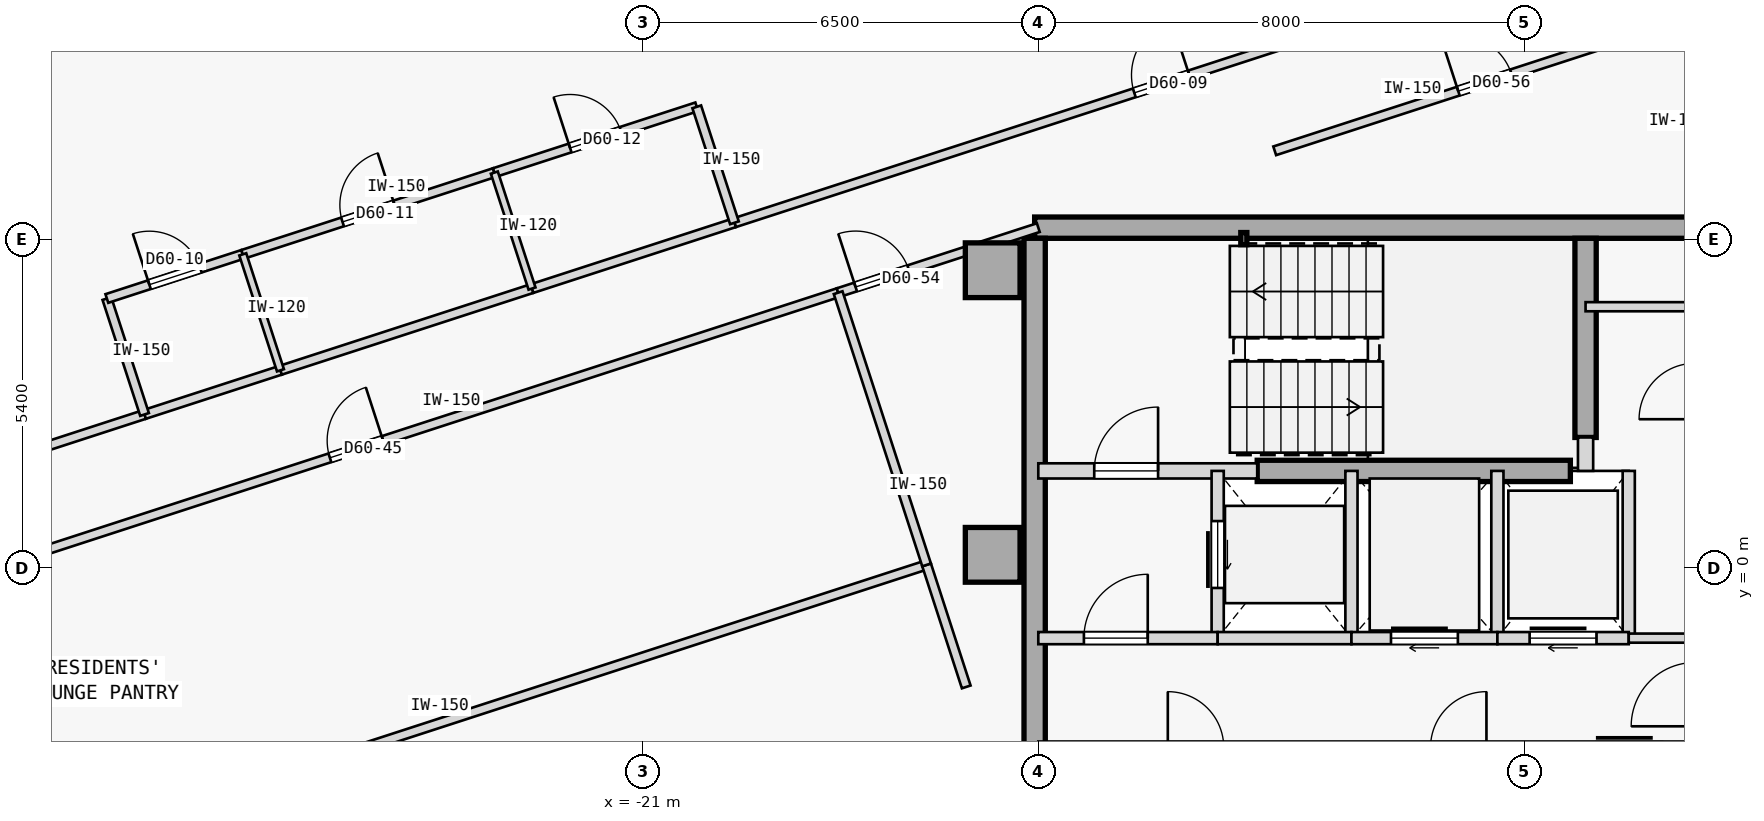
"""IFC4 building model, lengths in metres.
Left out: names, types, materials, properties, quantities, classifications, styles, units other than length and angle.
Written with IfcOpenShell. Run it as: python <this file> out.ifc"""

import sys

from ifc_helpers import new_model, si_unit, direction, frame, frame_2d, origin, origin_2d, place, context, subcontext, project, spatial, rectangle, hollow_rectangle, extrude, element, fill, save


model = new_model("IFC4")
c1 = context("Model", 3, precision=1e-05, world=origin(), true_north=direction((0.0, 1.0)))
c2 = subcontext(c1, "Body", "Model", "MODEL_VIEW")
j1 = project(units=[si_unit("LENGTHUNIT", "METRE"), si_unit("PLANEANGLEUNIT", "RADIAN")], contexts=[c1])
p1 = place(None, origin())
s1 = spatial("IfcSite", under=j1, at=p1, CompositionType="ELEMENT")
p2 = place(p1, origin())
s2 = spatial("IfcBuilding", under=s1, at=p2, CompositionType="ELEMENT")
p3 = place(p2, frame((0.0, 0.0, 227.65)))
s3 = spatial("IfcBuildingStorey", under=s2, at=p3, CompositionType="ELEMENT", Elevation=227.65)
for number, where, z_axis, x_axis in (
    (1, (-15.25, 4.9, 0.0), (0.0, 0.0, 1.0), (1.0, 0.0, 0.0)),
    (2, (-15.25, 0.22, 0.0), (0.0, 0.0, 1.0), (1.0, 0.0, 0.0)),
):
    element("IfcColumn", number, at=place(p3, frame(where, z_axis=z_axis, x_axis=x_axis)), inside=s3, PredefinedType="COLUMN", context=c2, shape_type="SweptSolid", body=[
        extrude(rectangle(XDim=0.9, YDim=0.9, at=origin_2d()), origin(), (0.0, 0.0, 1.0), 3.35),
    ])
p4 = place(p3, frame((-14.56, 5.6, 0.0), z_axis=(0.0, 0.0, 1.0), x_axis=(1.0, 0.0, 0.0)))
e3 = element("IfcWall", 3, at=p4, inside=s3, PredefinedType="SHEAR", context=c2, shape_type="SweptSolid", body=[
    extrude(rectangle(XDim=11.41, YDim=0.35, at=frame_2d((5.705, 0.0))), origin(), (0.0, 0.0, 1.0), 3.125),
])
p5 = place(p3, frame((-14.56, -5.425, 0.0), z_axis=(0.0, 0.0, 1.0), x_axis=(0.0, 1.0, 0.0)))
e4 = element("IfcWall", 4, at=p5, inside=s3, PredefinedType="SHEAR", context=c2, shape_type="SweptSolid", body=[
    extrude(rectangle(XDim=10.85, YDim=0.35, at=frame_2d((5.425, 0.0))), origin(), (0.0, 0.0, 1.0), 3.125),
])
p6 = place(p3, frame((-5.5, 2.15, 0.0), z_axis=(0.0, 0.0, 1.0), x_axis=(0.0, 1.0, 0.0)))
e5 = element("IfcWall", 5, at=p6, inside=s3, PredefinedType="SHEAR", context=c2, shape_type="SweptSolid", body=[
    extrude(rectangle(XDim=3.275, YDim=0.35, at=frame_2d((1.638, 0.0))), origin(), (0.0, 0.0, 1.0), 3.125),
])
p7 = place(p3, frame((-10.9, 1.6, 0.0), z_axis=(0.0, 0.0, 1.0), x_axis=(1.0, 0.0, 0.0)))
e6 = element("IfcWall", 6, at=p7, inside=s3, PredefinedType="SHEAR", context=c2, shape_type="SweptSolid", body=[
    extrude(rectangle(XDim=5.15, YDim=0.35, at=frame_2d((2.575, 0.0))), origin(), (0.0, 0.0, 1.0), 3.125),
])
p8 = place(p3, frame((-11.12, 5.42, 0.0), z_axis=(0.0, 0.0, 1.0), x_axis=(1.0, 0.0, 0.0)))
e7 = element("IfcColumn", 7, at=p8, inside=s3, PredefinedType="COLUMN", context=c2, shape_type="SweptSolid", body=[
    extrude(hollow_rectangle(XDim=0.1, YDim=0.2, WallThickness=0.008, at=origin_2d()), origin(), (0.0, 0.0, 1.0), 3.35),
])
p9 = place(p3, frame((-14.5, 1.6, 0.0), z_axis=(0.0, 0.0, 1.0), x_axis=(1.0, 0.0, 0.0)))
e8 = element("IfcWall", 8, at=p9, inside=s3, PredefinedType="STANDARD", context=c2, shape_type="SweptSolid", body=[
    extrude(rectangle(XDim=3.6, YDim=0.25, at=frame_2d((1.8, 0.0))), origin(), (0.0, 0.0, 1.0), 3.125),
])
p10 = place(p9, frame((0.92, 0.0, 0.0)))
e9 = element("IfcOpeningElement", 9, at=p10, cuts=e8, PredefinedType="OPENING", context=c2, shape_type="SweptSolid", body=[
    extrude(rectangle(XDim=1.05, YDim=2.15, at=frame_2d((0.525, 1.075))), frame((0.0, 0.135, 0.0), z_axis=(0.0, -1.0, 0.0), x_axis=(1.0, 0.0, 0.0)), (0.0, 0.0, 1.0), 0.27),
])
p11 = place(p3, frame((-5.5, 1.6, 0.0), z_axis=(0.0, 0.0, 1.0), x_axis=(0.0, 1.0, 0.0)))
e10 = element("IfcWall", 10, at=p11, inside=s3, PredefinedType="STANDARD", context=c2, shape_type="SweptSolid", body=[
    extrude(rectangle(XDim=0.55, YDim=0.25, at=frame_2d((0.275, 0.0))), origin(), (0.0, 0.0, 1.0), 3.125),
])
p12 = place(p3, frame((-11.55, -1.15, 0.0), z_axis=(0.0, 0.0, 1.0), x_axis=(0.0, 1.0, 0.0)))
e11 = element("IfcWall", 11, at=p12, inside=s3, PredefinedType="STANDARD", context=c2, shape_type="SweptSolid", body=[
    extrude(rectangle(XDim=2.75, YDim=0.2, at=frame_2d((1.375, 0.0))), origin(), (0.0, 0.0, 1.0), 3.125),
])
p13 = place(p12, frame((0.825, 0.0, 0.0)))
e12 = element("IfcOpeningElement", 12, at=p13, cuts=e11, PredefinedType="OPENING", context=c2, shape_type="SweptSolid", body=[
    extrude(rectangle(XDim=1.1, YDim=2.15, at=frame_2d((0.55, 1.075))), frame((0.0, 0.11, 0.0), z_axis=(0.0, -1.0, 0.0), x_axis=(1.0, 0.0, 0.0)), (0.0, 0.0, 1.0), 0.22),
])
p14 = place(p3, frame((-9.35, -1.15, 0.0), z_axis=(0.0, 0.0, 1.0), x_axis=(0.0, 1.0, 0.0)))
e13 = element("IfcWall", 13, at=p14, inside=s3, PredefinedType="STANDARD", context=c2, shape_type="SweptSolid", body=[
    extrude(rectangle(XDim=2.75, YDim=0.2, at=frame_2d((1.375, 0.0))), origin(), (0.0, 0.0, 1.0), 3.125),
])
p15 = place(p3, frame((-14.5, -1.15, 0.0), z_axis=(0.0, 0.0, 1.0), x_axis=(1.0, 0.0, 0.0)))
e14 = element("IfcWall", 14, at=p15, inside=s3, PredefinedType="STANDARD", context=c2, shape_type="SweptSolid", body=[
    extrude(rectangle(XDim=2.95, YDim=0.2, at=frame_2d((1.475, 0.0))), origin(), (0.0, 0.0, 1.0), 3.125),
])
p16 = place(p15, frame((0.75, 0.0, 0.0)))
e15 = element("IfcOpeningElement", 15, at=p16, cuts=e14, PredefinedType="OPENING", context=c2, shape_type="SweptSolid", body=[
    extrude(rectangle(XDim=1.05, YDim=2.18, at=frame_2d((0.525, 1.09))), frame((0.0, 0.11, 0.0), z_axis=(0.0, -1.0, 0.0), x_axis=(1.0, 0.0, 0.0)), (0.0, 0.0, 1.0), 0.22),
])
p17 = place(p3, frame((-11.55, -1.15, 0.0), z_axis=(0.0, 0.0, 1.0), x_axis=(1.0, 0.0, 0.0)))
e16 = element("IfcWall", 16, at=p17, inside=s3, PredefinedType="STANDARD", context=c2, shape_type="SweptSolid", body=[
    extrude(rectangle(XDim=2.2, YDim=0.2, at=frame_2d((1.1, 0.0))), origin(), (0.0, 0.0, 1.0), 3.125),
])
p18 = place(p3, frame((-6.95, -1.15, 0.0), z_axis=(0.0, 0.0, 1.0), x_axis=(0.0, 1.0, 0.0)))
e17 = element("IfcWall", 17, at=p18, inside=s3, PredefinedType="STANDARD", context=c2, shape_type="SweptSolid", body=[
    extrude(rectangle(XDim=2.75, YDim=0.2, at=frame_2d((1.375, 0.0))), origin(), (0.0, 0.0, 1.0), 3.125),
])
p19 = place(p3, frame((-9.35, -1.15, 0.0), z_axis=(0.0, 0.0, 1.0), x_axis=(1.0, 0.0, 0.0)))
e18 = element("IfcWall", 18, at=p19, inside=s3, PredefinedType="STANDARD", context=c2, shape_type="SweptSolid", body=[
    extrude(rectangle(XDim=2.4, YDim=0.2, at=frame_2d((1.2, 0.0))), origin(), (0.0, 0.0, 1.0), 3.125),
])
p20 = place(p19, frame((0.65, 0.0, 0.0)))
e19 = element("IfcOpeningElement", 19, at=p20, cuts=e18, PredefinedType="OPENING", context=c2, shape_type="SweptSolid", body=[
    extrude(rectangle(XDim=1.1, YDim=2.15, at=frame_2d((0.55, 1.075))), frame((0.0, 0.11, 0.0), z_axis=(0.0, -1.0, 0.0), x_axis=(1.0, 0.0, 0.0)), (0.0, 0.0, 1.0), 0.22),
])
p21 = place(p3, frame((-4.79, -1.15, 0.0), z_axis=(0.0, 0.0, 1.0), x_axis=(0.0, 1.0, 0.0)))
e20 = element("IfcWall", 20, at=p21, inside=s3, PredefinedType="STANDARD", context=c2, shape_type="SweptSolid", body=[
    extrude(rectangle(XDim=2.75, YDim=0.2, at=frame_2d((1.375, 0.0))), origin(), (0.0, 0.0, 1.0), 3.125),
])
p22 = place(p3, frame((-6.95, -1.15, 0.0), z_axis=(0.0, 0.0, 1.0), x_axis=(1.0, 0.0, 0.0)))
e21 = element("IfcWall", 21, at=p22, inside=s3, PredefinedType="STANDARD", context=c2, shape_type="SweptSolid", body=[
    extrude(rectangle(XDim=2.16, YDim=0.2, at=frame_2d((1.08, 0.0))), origin(), (0.0, 0.0, 1.0), 3.125),
])
p23 = place(p22, frame((0.53, 0.0, 0.0)))
e22 = element("IfcOpeningElement", 22, at=p23, cuts=e21, PredefinedType="OPENING", context=c2, shape_type="SweptSolid", body=[
    extrude(rectangle(XDim=1.1, YDim=2.15, at=frame_2d((0.55, 1.075))), frame((0.0, 0.11, 0.0), z_axis=(0.0, -1.0, 0.0), x_axis=(1.0, 0.0, 0.0)), (0.0, 0.0, 1.0), 0.22),
])
p24 = place(p3, frame((-4.79, -1.15, 0.0), z_axis=(0.0, 0.0, 1.0), x_axis=(1.0, 0.0, 0.0)))
e23 = element("IfcWall", 23, at=p24, inside=s3, PredefinedType="PARTITIONING", context=c2, shape_type="SweptSolid", body=[
    extrude(rectangle(XDim=1.09, YDim=0.15, at=frame_2d((0.545, 0.0))), origin(), (0.0, 0.0, 1.0), 3.125),
])
p25 = place(p3, frame((-5.5, 4.3, 0.0), z_axis=(0.0, 0.0, 1.0), x_axis=(1.0, 0.0, 0.0)))
e24 = element("IfcWall", 24, at=p25, inside=s3, PredefinedType="PARTITIONING", context=c2, shape_type="SweptSolid", body=[
    extrude(rectangle(XDim=1.8, YDim=0.15, at=frame_2d((0.9, 0.0))), origin(), (0.0, 0.0, 1.0), 3.125),
])
p26 = place(p3, frame((-36.012, 0.314, 0.0), z_axis=(0.0, 0.0, 1.0), x_axis=(0.951054850325, 0.309022121658, 0.0)))
e25 = element("IfcWall", 25, at=p26, inside=s3, PredefinedType="PARTITIONING", context=c2, shape_type="SweptSolid", body=[
    extrude(rectangle(XDim=7.165, YDim=0.15, at=frame_2d((3.583, 0.0))), origin(), (0.0, 0.0, 1.0), 3.125),
])
p27 = place(p3, frame((-19.497, 5.68, 0.0), z_axis=(0.0, 0.0, 1.0), x_axis=(0.95105300492, 0.309027801067, 0.0)))
e26 = element("IfcWall", 26, at=p27, inside=s3, PredefinedType="PARTITIONING", context=c2, shape_type="SweptSolid", body=[
    extrude(rectangle(XDim=14.779, YDim=0.15, at=frame_2d((7.39, 0.0))), origin(), (0.0, 0.0, 1.0), 3.125),
])
p28 = place(p27, frame((6.915, 0.0, 0.0)))
e27 = element("IfcOpeningElement", 27, at=p28, cuts=e26, PredefinedType="OPENING", context=c2, shape_type="SweptSolid", body=[
    extrude(rectangle(XDim=0.95, YDim=2.15, at=frame_2d((0.475, 1.075))), frame((0.0, 0.085, 0.0), z_axis=(0.0, -1.0, 0.0), x_axis=(1.0, 0.0, 0.0)), (0.0, 0.0, 1.0), 0.17),
])
p29 = place(p3, frame((-29.198, 2.528, 0.0), z_axis=(0.0, 0.0, 1.0), x_axis=(0.951076048914, 0.308956872689, 0.0)))
e28 = element("IfcWall", 28, at=p29, inside=s3, PredefinedType="PARTITIONING", context=c2, shape_type="SweptSolid", body=[
    extrude(rectangle(XDim=2.35, YDim=0.15, at=frame_2d((1.175, 0.0))), origin(), (0.0, 0.0, 1.0), 3.125),
])
p30 = place(p3, frame((-26.963, 3.254, 0.0), z_axis=(0.0, 0.0, 1.0), x_axis=(0.951057987102, 0.309012467661, 0.0)))
e29 = element("IfcWall", 29, at=p30, inside=s3, PredefinedType="PARTITIONING", context=c2, shape_type="SweptSolid", body=[
    extrude(rectangle(XDim=4.35, YDim=0.15, at=frame_2d((2.175, 0.0))), origin(), (0.0, 0.0, 1.0), 3.125),
])
p31 = place(p3, frame((-22.826, 4.599, 0.0), z_axis=(0.0, 0.0, 1.0), x_axis=(0.951055596592, 0.309019824916, 0.0)))
e30 = element("IfcWall", 30, at=p31, inside=s3, PredefinedType="PARTITIONING", context=c2, shape_type="SweptSolid", body=[
    extrude(rectangle(XDim=3.5, YDim=0.15, at=frame_2d((1.75, 0.0))), origin(), (0.0, 0.0, 1.0), 3.125),
])
p32 = place(p3, frame((-33.633, -0.616, 0.0), z_axis=(0.0, 0.0, 1.0), x_axis=(0.951058192995, 0.309011833974, 0.0)))
e31 = element("IfcWall", 31, at=p32, inside=s3, PredefinedType="PARTITIONING", context=c2, shape_type="SweptSolid", body=[
    extrude(rectangle(XDim=16.657, YDim=0.15, at=frame_2d((8.329, 0.0))), origin(), (0.0, 0.0, 1.0), 3.125),
])
p33 = place(p32, frame((7.868, 0.0, 0.0)))
e32 = element("IfcOpeningElement", 32, at=p33, cuts=e31, PredefinedType="OPENING", context=c2, shape_type="SweptSolid", body=[
    extrude(rectangle(XDim=0.92, YDim=2.15, at=frame_2d((0.46, 1.075))), frame((0.0, 0.085, 0.0), z_axis=(0.0, -1.0, 0.0), x_axis=(1.0, 0.0, 0.0)), (0.0, 0.0, 1.0), 0.17),
])
p34 = place(p3, frame((-17.792, 4.531, 0.0), z_axis=(0.0, 0.0, 1.0), x_axis=(0.951047546178, 0.309044600193, 0.0)))
e33 = element("IfcWall", 33, at=p34, inside=s3, PredefinedType="PARTITIONING", context=c2, shape_type="SweptSolid", body=[
    extrude(rectangle(XDim=3.461, YDim=0.15, at=frame_2d((1.73, 0.0))), origin(), (0.0, 0.0, 1.0), 3.125),
])
p35 = place(p34, frame((0.302, 0.0, 0.0)))
e34 = element("IfcOpeningElement", 34, at=p35, cuts=e33, PredefinedType="OPENING", context=c2, shape_type="SweptSolid", body=[
    extrude(rectangle(XDim=0.92, YDim=2.15, at=frame_2d((0.46, 1.075))), frame((0.0, 0.085, 0.0), z_axis=(0.0, -1.0, 0.0), x_axis=(1.0, 0.0, 0.0)), (0.0, 0.0, 1.0), 0.17),
])
p36 = place(p3, frame((-10.612, 6.864, 0.0), z_axis=(0.0, 0.0, 1.0), x_axis=(0.951060972078, 0.309003280548, 0.0)))
e35 = element("IfcWall", 35, at=p36, inside=s3, PredefinedType="PARTITIONING", context=c2, shape_type="SweptSolid", body=[
    extrude(rectangle(XDim=7.268, YDim=0.15, at=frame_2d((3.634, 0.0))), origin(), (0.0, 0.0, 1.0), 3.125),
])
p37 = place(p36, frame((3.174, 0.0, 0.0)))
e36 = element("IfcOpeningElement", 36, at=p37, cuts=e35, PredefinedType="OPENING", context=c2, shape_type="SweptSolid", body=[
    extrude(rectangle(XDim=0.92, YDim=2.15, at=frame_2d((0.46, 1.075))), frame((0.0, 0.085, 0.0), z_axis=(0.0, -1.0, 0.0), x_axis=(1.0, 0.0, 0.0)), (0.0, 0.0, 1.0), 0.17),
])
p38 = place(p3, frame((-29.198, 2.528, 0.0), z_axis=(0.0, 0.0, 1.0), x_axis=(-0.308948390121, 0.951078804433, 0.0)))
e37 = element("IfcWall", 37, at=p38, inside=s3, PredefinedType="PARTITIONING", context=c2, shape_type="SweptSolid", body=[
    extrude(rectangle(XDim=2.005, YDim=0.15, at=frame_2d((1.002, 0.0))), origin(), (0.0, 0.0, 1.0), 3.125),
])
p39 = place(p3, frame((-29.817, 4.435, 0.0), z_axis=(0.0, 0.0, 1.0), x_axis=(0.951035595692, 0.309081373955, 0.0)))
e38 = element("IfcWall", 38, at=p39, inside=s3, PredefinedType="PARTITIONING", context=c2, shape_type="SweptSolid", body=[
    extrude(rectangle(XDim=2.35, YDim=0.15, at=frame_2d((1.175, 0.0))), origin(), (0.0, 0.0, 1.0), 3.125),
])
p40 = place(p39, frame((0.735, 0.0, 0.0)))
e39 = element("IfcOpeningElement", 39, at=p40, cuts=e38, PredefinedType="OPENING", context=c2, shape_type="SweptSolid", body=[
    extrude(rectangle(XDim=0.88, YDim=2.15, at=frame_2d((0.44, 1.075))), frame((0.0, 0.085, 0.0), z_axis=(0.0, -1.0, 0.0), x_axis=(1.0, 0.0, 0.0)), (0.0, 0.0, 1.0), 0.17),
])
p41 = place(p3, frame((-27.583, 5.161, 0.0), z_axis=(0.0, 0.0, 1.0), x_axis=(0.951057987102, 0.309012467661, 0.0)))
e40 = element("IfcWall", 40, at=p41, inside=s3, PredefinedType="PARTITIONING", context=c2, shape_type="SweptSolid", body=[
    extrude(rectangle(XDim=4.35, YDim=0.15, at=frame_2d((2.175, 0.0))), origin(), (0.0, 0.0, 1.0), 3.125),
])
p42 = place(p41, frame((1.725, 0.0, 0.0)))
e41 = element("IfcOpeningElement", 41, at=p42, cuts=e40, PredefinedType="OPENING", context=c2, shape_type="SweptSolid", body=[
    extrude(rectangle(XDim=0.9, YDim=2.15, at=frame_2d((0.45, 1.075))), frame((0.0, 0.085, 0.0), z_axis=(0.0, -1.0, 0.0), x_axis=(1.0, 0.0, 0.0)), (0.0, 0.0, 1.0), 0.17),
])
p43 = place(p3, frame((-23.445, 6.506, 0.0), z_axis=(0.0, 0.0, 1.0), x_axis=(0.951055596592, 0.309019824916, 0.0)))
e42 = element("IfcWall", 42, at=p43, inside=s3, PredefinedType="PARTITIONING", context=c2, shape_type="SweptSolid", body=[
    extrude(rectangle(XDim=3.5, YDim=0.15, at=frame_2d((1.75, 0.0))), origin(), (0.0, 0.0, 1.0), 3.125),
])
p44 = place(p43, frame((1.31, 0.0, 0.0)))
e43 = element("IfcOpeningElement", 43, at=p44, cuts=e42, PredefinedType="OPENING", context=c2, shape_type="SweptSolid", body=[
    extrude(rectangle(XDim=0.88, YDim=2.15, at=frame_2d((0.44, 1.075))), frame((0.0, 0.085, 0.0), z_axis=(0.0, -1.0, 0.0), x_axis=(1.0, 0.0, 0.0)), (0.0, 0.0, 1.0), 0.17),
])
p45 = place(p3, frame((-19.497, 5.68, 0.0), z_axis=(0.0, 0.0, 1.0), x_axis=(-0.309022749039, 0.951054646472, 0.0)))
e44 = element("IfcWall", 44, at=p45, inside=s3, PredefinedType="PARTITIONING", context=c2, shape_type="SweptSolid", body=[
    extrude(rectangle(XDim=2.005, YDim=0.15, at=frame_2d((1.002, 0.0))), origin(), (0.0, 0.0, 1.0), 3.125),
])
for number, where, z_axis, x_axis in (
    (45, (-26.963, 3.254, 0.0), (0.0, 0.0, 1.0), (-0.309, 0.951, 0.0)),
    (46, (-22.826, 4.599, 0.0), (0.0, 0.0, 1.0), (-0.309, 0.951, 0.0)),
):
    element("IfcWall", number, at=place(p3, frame(where, z_axis=z_axis, x_axis=x_axis)), inside=s3, PredefinedType="PARTITIONING", context=c2, shape_type="SweptSolid", body=[
        extrude(rectangle(XDim=2.005, YDim=0.12, at=frame_2d((1.002, 0.0))), origin(), (0.0, 0.0, 1.0), 3.125),
    ])
p46 = place(p3, frame((-32.179, -5.093, 0.0), z_axis=(0.0, 0.0, 1.0), x_axis=(0.951053885426, 0.309025091239, 0.0)))
e47 = element("IfcWall", 47, at=p46, inside=s3, PredefinedType="PARTITIONING", context=c2, shape_type="SweptSolid", body=[
    extrude(rectangle(XDim=16.657, YDim=0.15, at=frame_2d((8.329, 0.0))), origin(), (0.0, 0.0, 1.0), 3.125),
])
p47 = place(p3, frame((-15.685, -1.952, 0.0), z_axis=(0.0, 0.0, 1.0), x_axis=(-0.308929092959, 0.951085072706, 0.0)))
e48 = element("IfcWall", 48, at=p47, inside=s3, PredefinedType="PARTITIONING", context=c2, shape_type="SweptSolid", body=[
    extrude(rectangle(XDim=2.11, YDim=0.15, at=frame_2d((1.055, 0.0))), origin(), (0.0, 0.0, 1.0), 3.125),
])
p48 = place(p3, frame((-16.337, 0.054, 0.0), z_axis=(0.0, 0.0, 1.0), x_axis=(-0.309029776355, 0.951052363083, 0.0)))
e49 = element("IfcWall", 49, at=p48, inside=s3, PredefinedType="PARTITIONING", context=c2, shape_type="SweptSolid", body=[
    extrude(rectangle(XDim=4.707, YDim=0.15, at=frame_2d((2.354, 0.0))), origin(), (0.0, 0.0, 1.0), 3.125),
])
p49 = place(p10, origin())
e50 = element("IfcDoor", 50, at=p49, inside=s3, OperationType="SINGLE_SWING_RIGHT", PredefinedType="DOOR", context=c2, shape_type="SweptSolid", body=[
    extrude(rectangle(XDim=1.05, YDim=2.15, at=frame_2d((0.525, 1.075))), frame((0.0, 0.025, 0.0), z_axis=(0.0, -1.0, 0.0), x_axis=(1.0, 0.0, 0.0)), (0.0, 0.0, 1.0), 0.05),
])
fill(e9, e50)
p50 = place(p16, origin())
e51 = element("IfcDoor", 51, at=p50, inside=s3, OperationType="SINGLE_SWING_RIGHT", PredefinedType="DOOR", context=c2, shape_type="SweptSolid", body=[
    extrude(rectangle(XDim=1.05, YDim=2.18, at=frame_2d((0.525, 1.09))), frame((0.0, 0.025, 0.0), z_axis=(0.0, -1.0, 0.0), x_axis=(1.0, 0.0, 0.0)), (0.0, 0.0, 1.0), 0.05),
])
fill(e15, e51)
p51 = place(p13, origin())
e52 = element("IfcDoor", 52, at=p51, inside=s3, OperationType="SLIDING_TO_RIGHT", PredefinedType="DOOR", context=c2, shape_type="SweptSolid", body=[
    extrude(rectangle(XDim=1.1, YDim=2.15, at=frame_2d((0.55, 1.075))), frame((0.0, 0.025, 0.0), z_axis=(0.0, -1.0, 0.0), x_axis=(1.0, 0.0, 0.0)), (0.0, 0.0, 1.0), 0.05),
])
fill(e12, e52)
p52 = place(p20, origin())
e53 = element("IfcDoor", 53, at=p52, inside=s3, OperationType="SLIDING_TO_RIGHT", PredefinedType="DOOR", context=c2, shape_type="SweptSolid", body=[
    extrude(rectangle(XDim=1.1, YDim=2.15, at=frame_2d((0.55, 1.075))), frame((0.0, 0.025, 0.0), z_axis=(0.0, -1.0, 0.0), x_axis=(1.0, 0.0, 0.0)), (0.0, 0.0, 1.0), 0.05),
])
fill(e19, e53)
p53 = place(p23, origin())
e54 = element("IfcDoor", 54, at=p53, inside=s3, OperationType="SLIDING_TO_RIGHT", PredefinedType="DOOR", context=c2, shape_type="SweptSolid", body=[
    extrude(rectangle(XDim=1.1, YDim=2.15, at=frame_2d((0.55, 1.075))), frame((0.0, 0.025, 0.0), z_axis=(0.0, -1.0, 0.0), x_axis=(1.0, 0.0, 0.0)), (0.0, 0.0, 1.0), 0.05),
])
fill(e22, e54)
p54 = place(p28, origin())
e55 = element("IfcDoor", 55, at=p54, inside=s3, OperationType="SINGLE_SWING_RIGHT", PredefinedType="DOOR", context=c2, shape_type="SweptSolid", body=[
    extrude(rectangle(XDim=0.95, YDim=2.15, at=frame_2d((0.475, 1.075))), frame((0.0, 0.025, 0.0), z_axis=(0.0, -1.0, 0.0), x_axis=(1.0, 0.0, 0.0)), (0.0, 0.0, 1.0), 0.05),
])
fill(e27, e55)
p55 = place(p40, origin())
e56 = element("IfcDoor", 56, at=p55, inside=s3, OperationType="SINGLE_SWING_LEFT", PredefinedType="DOOR", context=c2, shape_type="SweptSolid", body=[
    extrude(rectangle(XDim=0.88, YDim=2.15, at=frame_2d((0.44, 1.075))), frame((0.0, 0.025, 0.0), z_axis=(0.0, -1.0, 0.0), x_axis=(1.0, 0.0, 0.0)), (0.0, 0.0, 1.0), 0.05),
])
fill(e39, e56)
p56 = place(p42, origin())
e57 = element("IfcDoor", 57, at=p56, inside=s3, OperationType="SINGLE_SWING_RIGHT", PredefinedType="DOOR", context=c2, shape_type="SweptSolid", body=[
    extrude(rectangle(XDim=0.9, YDim=2.15, at=frame_2d((0.45, 1.075))), frame((0.0, 0.025, 0.0), z_axis=(0.0, -1.0, 0.0), x_axis=(1.0, 0.0, 0.0)), (0.0, 0.0, 1.0), 0.05),
])
fill(e41, e57)
p57 = place(p44, origin())
e58 = element("IfcDoor", 58, at=p57, inside=s3, OperationType="SINGLE_SWING_LEFT", PredefinedType="DOOR", context=c2, shape_type="SweptSolid", body=[
    extrude(rectangle(XDim=0.88, YDim=2.15, at=frame_2d((0.44, 1.075))), frame((0.0, 0.025, 0.0), z_axis=(0.0, -1.0, 0.0), x_axis=(1.0, 0.0, 0.0)), (0.0, 0.0, 1.0), 0.05),
])
fill(e43, e58)
p58 = place(p33, origin())
e59 = element("IfcDoor", 59, at=p58, inside=s3, OperationType="SINGLE_SWING_RIGHT", PredefinedType="DOOR", context=c2, shape_type="SweptSolid", body=[
    extrude(rectangle(XDim=0.92, YDim=2.15, at=frame_2d((0.46, 1.075))), frame((0.0, 0.025, 0.0), z_axis=(0.0, -1.0, 0.0), x_axis=(1.0, 0.0, 0.0)), (0.0, 0.0, 1.0), 0.05),
])
fill(e32, e59)
p59 = place(p35, origin())
e60 = element("IfcDoor", 60, at=p59, inside=s3, OperationType="SINGLE_SWING_LEFT", PredefinedType="DOOR", context=c2, shape_type="SweptSolid", body=[
    extrude(rectangle(XDim=0.92, YDim=2.15, at=frame_2d((0.46, 1.075))), frame((0.0, 0.025, 0.0), z_axis=(0.0, -1.0, 0.0), x_axis=(1.0, 0.0, 0.0)), (0.0, 0.0, 1.0), 0.05),
])
fill(e34, e60)
p60 = place(p37, origin())
e61 = element("IfcDoor", 61, at=p60, inside=s3, OperationType="SINGLE_SWING_LEFT", PredefinedType="DOOR", context=c2, shape_type="SweptSolid", body=[
    extrude(rectangle(XDim=0.92, YDim=2.15, at=frame_2d((0.46, 1.075))), frame((0.0, 0.025, 0.0), z_axis=(0.0, -1.0, 0.0), x_axis=(1.0, 0.0, 0.0)), (0.0, 0.0, 1.0), 0.05),
])
fill(e36, e61)
save(model, sys.argv[1])
